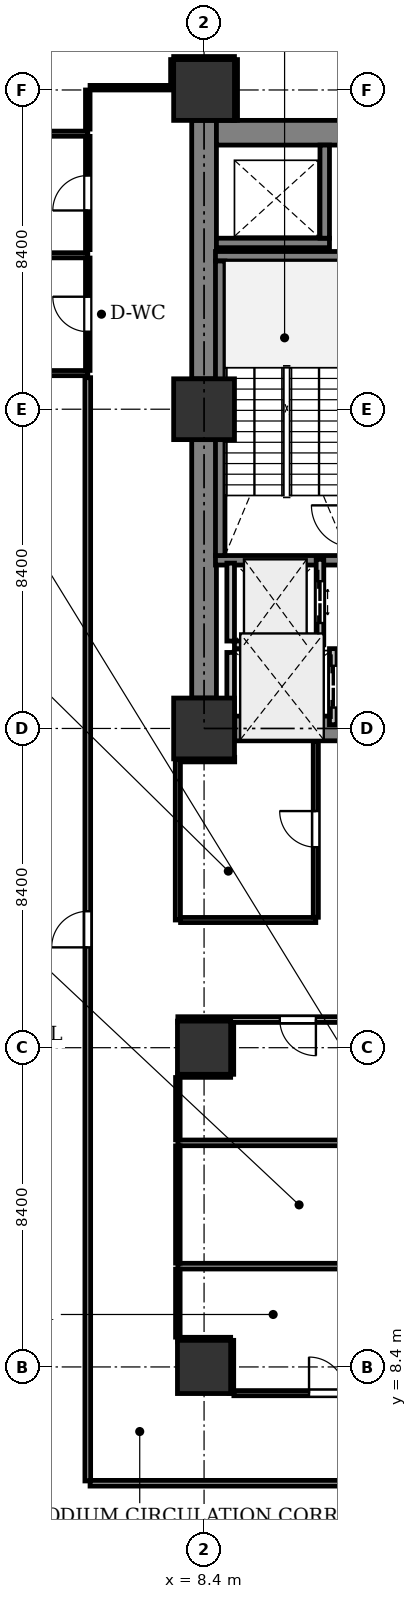
"""IFC4 building model, lengths in metres.
Left out: names, types, materials, properties, quantities, classifications, styles, units other than length and angle.
Written with IfcOpenShell. Run it as: python <this file> out.ifc"""

import sys

from ifc_helpers import new_model, si_unit, direction, frame, frame_2d, origin, origin_2d, place, context, subcontext, project, spatial, rectangle, extrude, element, fill, save


model = new_model("IFC4")
c1 = context("Model", 3, precision=1e-05, world=origin(), true_north=direction((0.0, 1.0)))
c2 = subcontext(c1, "Body", "Model", "MODEL_VIEW")
j1 = project(units=[si_unit("LENGTHUNIT", "METRE"), si_unit("PLANEANGLEUNIT", "RADIAN")], contexts=[c1])
p1 = place(None, origin())
s1 = spatial("IfcSite", under=j1, at=p1, CompositionType="ELEMENT")
p2 = place(p1, origin())
s2 = spatial("IfcBuilding", under=s1, at=p2, CompositionType="ELEMENT")
p3 = place(p2, frame((0.0, 0.0, 5.4)))
s3 = spatial("IfcBuildingStorey", under=s2, at=p3, CompositionType="ELEMENT", Elevation=5.4)
for number, where, z_axis, x_axis in (
    (1, (8.4, 8.4, 0.0), (0.0, 0.0, 1.0), (1.0, 0.0, 0.0)),
    (2, (8.4, 16.8, 0.0), (0.0, 0.0, 1.0), (1.0, 0.0, 0.0)),
):
    element("IfcColumn", number, at=place(p3, frame(where, z_axis=z_axis, x_axis=x_axis)), inside=s3, PredefinedType="COLUMN", context=c2, shape_type="SweptSolid", body=[
        extrude(rectangle(XDim=1.4, YDim=1.4, at=origin_2d()), origin(), (0.0, 0.0, 1.0), 4.8),
    ])
for number, where, z_axis, x_axis in (
    (3, (8.4, 25.2, 0.0), (0.0, 0.0, 1.0), (1.0, 0.0, 0.0)),
    (4, (8.4, 33.6, 0.0), (0.0, 0.0, 1.0), (1.0, 0.0, 0.0)),
    (5, (8.4, 42.0, 0.0), (0.0, 0.0, 1.0), (1.0, 0.0, 0.0)),
):
    element("IfcColumn", number, at=place(p3, frame(where, z_axis=z_axis, x_axis=x_axis)), inside=s3, PredefinedType="COLUMN", context=c2, shape_type="SweptSolid", body=[
        extrude(rectangle(XDim=1.6, YDim=1.6, at=origin_2d()), origin(), (0.0, 0.0, 1.0), 4.8),
    ])
for number, where, z_axis, x_axis in (
    (6, (8.4, 26.0, 0.0), (0.0, 0.0, 1.0), (0.0, 1.0, 0.0)),
    (7, (8.4, 34.4, 0.0), (0.0, 0.0, 1.0), (0.0, 1.0, 0.0)),
):
    element("IfcWall", number, at=place(p3, frame(where, z_axis=z_axis, x_axis=x_axis)), inside=s3, PredefinedType="SHEAR", context=c2, shape_type="SweptSolid", body=[
        extrude(rectangle(XDim=6.8, YDim=0.65, at=frame_2d((3.4, 0.0))), origin(), (0.0, 0.0, 1.0), 4.525),
    ])
p4 = place(p3, frame((8.725, 40.875, 0.0), z_axis=(0.0, 0.0, 1.0), x_axis=(1.0, 0.0, 0.0)))
e8 = element("IfcWall", 8, at=p4, inside=s3, PredefinedType="SHEAR", context=c2, shape_type="SweptSolid", body=[
    extrude(rectangle(XDim=7.75, YDim=0.65, at=frame_2d((3.875, 0.0))), origin(), (0.0, 0.0, 1.0), 4.525),
])
p5 = place(p3, frame((9.2, 25.2, 0.0), z_axis=(0.0, 0.0, 1.0), x_axis=(1.0, 0.0, 0.0)))
e9 = element("IfcWall", 9, at=p5, inside=s3, PredefinedType="SHEAR", context=c2, shape_type="SweptSolid", body=[
    extrude(rectangle(XDim=6.8, YDim=0.65, at=frame_2d((3.4, 0.0))), origin(), (0.0, 0.0, 1.0), 4.525),
])
p6 = place(p5, frame((3.5, 0.0, 0.0)))
e10 = element("IfcOpeningElement", 10, at=p6, cuts=e9, PredefinedType="OPENING", context=c2, shape_type="SweptSolid", body=[
    extrude(rectangle(XDim=1.1, YDim=2.15, at=frame_2d((0.55, 1.075))), frame((0.0, 0.335, 0.0), z_axis=(0.0, -1.0, 0.0), x_axis=(1.0, 0.0, 0.0)), (0.0, 0.0, 1.0), 0.67),
])
for number, where, z_axis, x_axis in (
    (11, (12.45, 29.625, 0.0), (0.0, 0.0, 1.0), (-1.0, 0.0, 0.0)),
    (12, (12.45, 37.625, 0.0), (0.0, 0.0, 1.0), (-1.0, 0.0, 0.0)),
):
    element("IfcWall", number, at=place(p3, frame(where, z_axis=z_axis, x_axis=x_axis)), inside=s3, PredefinedType="SHEAR", context=c2, shape_type="SweptSolid", body=[
        extrude(rectangle(XDim=3.75, YDim=0.25, at=frame_2d((1.875, 0.0))), origin(), (0.0, 0.0, 1.0), 4.525),
    ])
p7 = place(p3, frame((8.825, 29.75, 0.0), z_axis=(0.0, 0.0, 1.0), x_axis=(0.0, 1.0, 0.0)))
e13 = element("IfcWall", 13, at=p7, inside=s3, PredefinedType="SHEAR", context=c2, shape_type="SweptSolid", body=[
    extrude(rectangle(XDim=7.75, YDim=0.25, at=frame_2d((3.875, 0.0))), origin(), (0.0, 0.0, 1.0), 4.525),
])
p8 = place(p3, frame((8.725, 37.975, 0.0), z_axis=(0.0, 0.0, 1.0), x_axis=(1.0, 0.0, 0.0)))
e14 = element("IfcWall", 14, at=p8, inside=s3, PredefinedType="SHEAR", context=c2, shape_type="SweptSolid", body=[
    extrude(rectangle(XDim=2.975, YDim=0.25, at=frame_2d((1.487, 0.0))), origin(), (0.0, 0.0, 1.0), 4.525),
])
p9 = place(p3, frame((11.575, 38.1, 0.0), z_axis=(0.0, 0.0, 1.0), x_axis=(0.0, 1.0, 0.0)))
e15 = element("IfcWall", 15, at=p9, inside=s3, PredefinedType="SHEAR", context=c2, shape_type="SweptSolid", body=[
    extrude(rectangle(XDim=2.45, YDim=0.25, at=frame_2d((1.225, 0.0))), origin(), (0.0, 0.0, 1.0), 4.525),
])
p10 = place(p3, frame((11.45, 27.4, 0.0), z_axis=(0.0, 0.0, 1.0), x_axis=(0.0, 1.0, 0.0)))
e16 = element("IfcWall", 16, at=p10, inside=s3, PredefinedType="PARTITIONING", context=c2, shape_type="SweptSolid", body=[
    extrude(rectangle(XDim=2.25, YDim=0.2, at=frame_2d((1.125, 0.0))), origin(), (0.0, 0.0, 1.0), 4.525),
])
p11 = place(p10, frame((0.575, 0.0, 0.0)))
e17 = element("IfcOpeningElement", 17, at=p11, cuts=e16, PredefinedType="OPENING", context=c2, shape_type="SweptSolid", body=[
    extrude(rectangle(XDim=1.1, YDim=2.2, at=frame_2d((0.55, 1.1))), frame((0.0, 0.11, 0.0), z_axis=(0.0, -1.0, 0.0), x_axis=(1.0, 0.0, 0.0)), (0.0, 0.0, 1.0), 0.22),
])
p12 = place(p3, frame((9.1, 27.5, 0.0), z_axis=(0.0, 0.0, 1.0), x_axis=(0.0, 1.0, 0.0)))
e18 = element("IfcWall", 18, at=p12, inside=s3, PredefinedType="PARTITIONING", context=c2, shape_type="SweptSolid", body=[
    extrude(rectangle(XDim=2.05, YDim=0.2, at=frame_2d((1.025, 0.0))), origin(), (0.0, 0.0, 1.0), 4.525),
])
p13 = place(p3, frame((9.2, 27.4, 0.0), z_axis=(0.0, 0.0, 1.0), x_axis=(1.0, 0.0, 0.0)))
e19 = element("IfcWall", 19, at=p13, inside=s3, PredefinedType="PARTITIONING", context=c2, shape_type="SweptSolid", body=[
    extrude(rectangle(XDim=2.15, YDim=0.2, at=frame_2d((1.075, 0.0))), origin(), (0.0, 0.0, 1.0), 4.525),
])
p14 = place(p3, frame((11.8, 25.3, 0.0), z_axis=(0.0, 0.0, 1.0), x_axis=(0.0, 1.0, 0.0)))
e20 = element("IfcWall", 20, at=p14, inside=s3, PredefinedType="PARTITIONING", context=c2, shape_type="SweptSolid", body=[
    extrude(rectangle(XDim=2.0, YDim=0.2, at=frame_2d((1.0, 0.0))), origin(), (0.0, 0.0, 1.0), 4.525),
])
p15 = place(p14, frame((0.45, 0.0, 0.0)))
e21 = element("IfcOpeningElement", 21, at=p15, cuts=e20, PredefinedType="OPENING", context=c2, shape_type="SweptSolid", body=[
    extrude(rectangle(XDim=1.1, YDim=2.2, at=frame_2d((0.55, 1.1))), frame((0.0, 0.11, 0.0), z_axis=(0.0, -1.0, 0.0), x_axis=(1.0, 0.0, 0.0)), (0.0, 0.0, 1.0), 0.22),
])
p16 = place(p3, frame((9.1, 25.4, 0.0), z_axis=(0.0, 0.0, 1.0), x_axis=(0.0, 1.0, 0.0)))
e22 = element("IfcWall", 22, at=p16, inside=s3, PredefinedType="PARTITIONING", context=c2, shape_type="SweptSolid", body=[
    extrude(rectangle(XDim=1.8, YDim=0.2, at=frame_2d((0.9, 0.0))), origin(), (0.0, 0.0, 1.0), 4.525),
])
for number, where, z_axis, x_axis in (
    (23, (5.34, 37.65, 0.0), (0.0, 0.0, 1.0), (-1.0, 0.0, 0.0)),
    (24, (0.169, 34.55, 0.0), (0.0, 0.0, 1.0), (1.0, 0.0, 0.0)),
):
    element("IfcWall", number, at=place(p3, frame(where, z_axis=z_axis, x_axis=x_axis)), inside=s3, PredefinedType="PARTITIONING", context=c2, shape_type="SweptSolid", body=[
        extrude(rectangle(XDim=5.171, YDim=0.135, at=frame_2d((2.585, 0.0))), origin(), (0.0, 0.0, 1.0), 4.122),
    ])
p17 = place(p3, frame((5.34, 34.622, 0.0), z_axis=(0.0, 0.0, 1.0), x_axis=(0.0, 1.0, 0.0)))
e25 = element("IfcWall", 25, at=p17, inside=s3, PredefinedType="PARTITIONING", context=c2, shape_type="SweptSolid", body=[
    extrude(rectangle(XDim=2.957, YDim=0.12, at=frame_2d((1.479, 0.0))), origin(), (0.0, 0.0, 1.0), 4.525),
])
p18 = place(p17, frame((1.019, 0.0, 0.0)))
e26 = element("IfcOpeningElement", 26, at=p18, cuts=e25, PredefinedType="OPENING", context=c2, shape_type="SweptSolid", body=[
    extrude(rectangle(XDim=0.92, YDim=2.1, at=frame_2d((0.46, 1.05))), frame((0.0, 0.07, 0.0), z_axis=(0.0, -1.0, 0.0), x_axis=(1.0, 0.0, 0.0)), (0.0, 0.0, 1.0), 0.14),
])
p19 = place(p3, frame((5.34, 40.85, 0.0), z_axis=(0.0, 0.0, 1.0), x_axis=(-1.0, 0.0, 0.0)))
e27 = element("IfcWall", 27, at=p19, inside=s3, PredefinedType="PARTITIONING", context=c2, shape_type="SweptSolid", body=[
    extrude(rectangle(XDim=5.171, YDim=0.135, at=frame_2d((2.585, 0.0))), origin(), (0.0, 0.0, 1.0), 4.122),
])
p20 = place(p3, frame((5.34, 37.8, 0.0), z_axis=(0.0, 0.0, 1.0), x_axis=(0.0, 1.0, 0.0)))
e28 = element("IfcWall", 28, at=p20, inside=s3, PredefinedType="PARTITIONING", context=c2, shape_type="SweptSolid", body=[
    extrude(rectangle(XDim=2.979, YDim=0.12, at=frame_2d((1.489, 0.0))), origin(), (0.0, 0.0, 1.0), 4.525),
])
p21 = place(p20, frame((1.029, 0.0, 0.0)))
e29 = element("IfcOpeningElement", 29, at=p21, cuts=e28, PredefinedType="OPENING", context=c2, shape_type="SweptSolid", body=[
    extrude(rectangle(XDim=0.92, YDim=2.1, at=frame_2d((0.46, 1.05))), frame((0.0, 0.07, 0.0), z_axis=(0.0, -1.0, 0.0), x_axis=(1.0, 0.0, 0.0)), (0.0, 0.0, 1.0), 0.14),
])
p22 = place(p3, frame((7.71, 14.296, 0.0), z_axis=(0.0, 0.0, 1.0), x_axis=(1.0, 0.0, 0.0)))
e30 = element("IfcWall", 30, at=p22, inside=s3, PredefinedType="PARTITIONING", context=c2, shape_type="SweptSolid", body=[
    extrude(rectangle(XDim=6.38, YDim=0.15, at=frame_2d((3.19, 0.0))), origin(), (0.0, 0.0, 1.0), 3.913),
])
p23 = place(p3, frame((14.026, 17.54, 0.0), z_axis=(0.0, 0.0, 1.0), x_axis=(-1.0, 0.0, 0.0)))
e31 = element("IfcWall", 31, at=p23, inside=s3, PredefinedType="PARTITIONING", context=c2, shape_type="SweptSolid", body=[
    extrude(rectangle(XDim=6.316, YDim=0.15, at=frame_2d((3.158, 0.0))), origin(), (0.0, 0.0, 1.0), 3.913),
])
p24 = place(p23, frame((2.683, 0.0, 0.0)))
e32 = element("IfcOpeningElement", 32, at=p24, cuts=e31, PredefinedType="OPENING", context=c2, shape_type="SweptSolid", body=[
    extrude(rectangle(XDim=0.95, YDim=2.15, at=frame_2d((0.475, 1.075))), frame((0.0, 0.085, 0.0), z_axis=(0.0, -1.0, 0.0), x_axis=(1.0, 0.0, 0.0)), (0.0, 0.0, 1.0), 0.17),
])
p25 = place(p3, frame((9.12, 17.461, 0.0), z_axis=(0.0, 0.0, 1.0), x_axis=(0.0, -1.0, 0.0)))
e33 = element("IfcWall", 33, at=p25, inside=s3, PredefinedType="PARTITIONING", context=c2, shape_type="SweptSolid", body=[
    extrude(rectangle(XDim=1.361, YDim=0.12, at=frame_2d((0.68, 0.0))), origin(), (0.0, 0.0, 1.0), 3.725),
])
p26 = place(p3, frame((9.1, 16.08, 0.0), z_axis=(0.0, 0.0, 1.0), x_axis=(-1.0, 0.0, 0.0)))
e34 = element("IfcWall", 34, at=p26, inside=s3, PredefinedType="PARTITIONING", context=c2, shape_type="SweptSolid", body=[
    extrude(rectangle(XDim=1.39, YDim=0.12, at=frame_2d((0.695, 0.0))), origin(), (0.0, 0.0, 1.0), 3.913),
])
p27 = place(p3, frame((7.71, 16.016, 0.0), z_axis=(0.0, 0.0, 1.0), x_axis=(0.0, -1.0, 0.0)))
e35 = element("IfcWall", 35, at=p27, inside=s3, PredefinedType="PARTITIONING", context=c2, shape_type="SweptSolid", body=[
    extrude(rectangle(XDim=1.641, YDim=0.12, at=frame_2d((0.821, 0.0))), origin(), (0.0, 0.0, 1.0), 4.525),
])
p28 = place(p3, frame((7.71, 11.052, 0.0), z_axis=(0.0, 0.0, 1.0), x_axis=(1.0, 0.0, 0.0)))
e36 = element("IfcWall", 36, at=p28, inside=s3, PredefinedType="PARTITIONING", context=c2, shape_type="SweptSolid", body=[
    extrude(rectangle(XDim=6.38, YDim=0.15, at=frame_2d((3.19, 0.0))), origin(), (0.0, 0.0, 1.0), 3.913),
])
p29 = place(p3, frame((7.71, 14.217, 0.0), z_axis=(0.0, 0.0, 1.0), x_axis=(0.0, -1.0, 0.0)))
e37 = element("IfcWall", 37, at=p29, inside=s3, PredefinedType="PARTITIONING", context=c2, shape_type="SweptSolid", body=[
    extrude(rectangle(XDim=3.086, YDim=0.12, at=frame_2d((1.543, 0.0))), origin(), (0.0, 0.0, 1.0), 4.525),
])
p30 = place(p3, frame((7.71, 9.12, 0.0), z_axis=(0.0, 0.0, 1.0), x_axis=(1.0, 0.0, 0.0)))
e38 = element("IfcWall", 38, at=p30, inside=s3, PredefinedType="PARTITIONING", context=c2, shape_type="SweptSolid", body=[
    extrude(rectangle(XDim=1.39, YDim=0.12, at=frame_2d((0.695, 0.0))), origin(), (0.0, 0.0, 1.0), 3.913),
])
p31 = place(p3, frame((9.12, 9.1, 0.0), z_axis=(0.0, 0.0, 1.0), x_axis=(0.0, -1.0, 0.0)))
e39 = element("IfcWall", 39, at=p31, inside=s3, PredefinedType="PARTITIONING", context=c2, shape_type="SweptSolid", body=[
    extrude(rectangle(XDim=1.39, YDim=0.12, at=frame_2d((0.695, 0.0))), origin(), (0.0, 0.0, 1.0), 3.725),
])
p32 = place(p3, frame((9.184, 7.71, 0.0), z_axis=(0.0, 0.0, 1.0), x_axis=(1.0, 0.0, 0.0)))
e40 = element("IfcWall", 40, at=p32, inside=s3, PredefinedType="PARTITIONING", context=c2, shape_type="SweptSolid", body=[
    extrude(rectangle(XDim=4.906, YDim=0.135, at=frame_2d((2.453, 0.0))), origin(), (0.0, 0.0, 1.0), 4.122),
])
p33 = place(p32, frame((1.978, 0.0, 0.0)))
e41 = element("IfcOpeningElement", 41, at=p33, cuts=e40, PredefinedType="OPENING", context=c2, shape_type="SweptSolid", body=[
    extrude(rectangle(XDim=0.95, YDim=2.15, at=frame_2d((0.475, 1.075))), frame((0.0, 0.077, 0.0), z_axis=(0.0, -1.0, 0.0), x_axis=(1.0, 0.0, 0.0)), (0.0, 0.0, 1.0), 0.155),
])
p34 = place(p3, frame((7.71, 10.973, 0.0), z_axis=(0.0, 0.0, 1.0), x_axis=(0.0, -1.0, 0.0)))
e42 = element("IfcWall", 42, at=p34, inside=s3, PredefinedType="PARTITIONING", context=c2, shape_type="SweptSolid", body=[
    extrude(rectangle(XDim=1.789, YDim=0.12, at=frame_2d((0.895, 0.0))), origin(), (0.0, 0.0, 1.0), 4.525),
])
p35 = place(p3, frame((5.34, 40.97, 0.0), z_axis=(0.0, 0.0, 1.0), x_axis=(0.0, 1.0, 0.0)))
e43 = element("IfcWall", 43, at=p35, inside=s3, PredefinedType="PARTITIONING", context=c2, shape_type="SweptSolid", body=[
    extrude(rectangle(XDim=1.03, YDim=0.12, at=frame_2d((0.515, 0.0))), origin(), (0.0, 0.0, 1.0), 3.725),
])
p36 = place(p3, frame((5.4, 42.06, 0.0), z_axis=(0.0, 0.0, 1.0), x_axis=(1.0, 0.0, 0.0)))
e44 = element("IfcWall", 44, at=p36, inside=s3, PredefinedType="PARTITIONING", context=c2, shape_type="SweptSolid", body=[
    extrude(rectangle(XDim=2.18, YDim=0.12, at=frame_2d((1.09, 0.0))), origin(), (0.0, 0.0, 1.0), 3.725),
])
p37 = place(p3, frame((7.58, 42.124, 0.0), z_axis=(0.0, 0.0, 1.0), x_axis=(0.0, 1.0, 0.0)))
e45 = element("IfcWall", 45, at=p37, inside=s3, PredefinedType="PARTITIONING", context=c2, shape_type="SweptSolid", body=[
    extrude(rectangle(XDim=0.676, YDim=0.12, at=frame_2d((0.338, 0.0))), origin(), (0.0, 0.0, 1.0), 4.525),
])
p38 = place(p3, frame((7.6, 42.82, 0.0), z_axis=(0.0, 0.0, 1.0), x_axis=(1.0, 0.0, 0.0)))
e46 = element("IfcWall", 46, at=p38, inside=s3, PredefinedType="PARTITIONING", context=c2, shape_type="SweptSolid", body=[
    extrude(rectangle(XDim=1.6, YDim=0.12, at=frame_2d((0.8, 0.0))), origin(), (0.0, 0.0, 1.0), 3.913),
])
p39 = place(p3, frame((9.22, 42.8, 0.0), z_axis=(0.0, 0.0, 1.0), x_axis=(0.0, -1.0, 0.0)))
e47 = element("IfcWall", 47, at=p39, inside=s3, PredefinedType="PARTITIONING", context=c2, shape_type="SweptSolid", body=[
    extrude(rectangle(XDim=1.596, YDim=0.12, at=frame_2d((0.798, 0.0))), origin(), (0.0, 0.0, 1.0), 3.725),
])
p40 = place(p3, frame((9.206, 24.381, 0.0), z_axis=(0.0, 0.0, 1.0), x_axis=(-0.999999786895, -0.00065284791, 0.0)))
e48 = element("IfcWall", 48, at=p40, inside=s3, PredefinedType="PARTITIONING", context=c2, shape_type="SweptSolid", body=[
    extrude(rectangle(XDim=1.496, YDim=0.12, at=frame_2d((0.748, 0.0))), origin(), (0.0, 0.0, 1.0), 3.913),
])
p41 = place(p3, frame((7.71, 24.38, 0.0), z_axis=(0.0, 0.0, 1.0), x_axis=(0.0, -1.0, 0.0)))
e49 = element("IfcWall", 49, at=p41, inside=s3, PredefinedType="PARTITIONING", context=c2, shape_type="SweptSolid", body=[
    extrude(rectangle(XDim=4.22, YDim=0.135, at=frame_2d((2.11, 0.0))), origin(), (0.0, 0.0, 1.0), 4.525),
])
p42 = place(p3, frame((7.781, 20.16, 0.0), z_axis=(0.0, 0.0, 1.0), x_axis=(1.0, 0.0, 0.0)))
e50 = element("IfcWall", 50, at=p42, inside=s3, PredefinedType="PARTITIONING", context=c2, shape_type="SweptSolid", body=[
    extrude(rectangle(XDim=3.559, YDim=0.135, at=frame_2d((1.779, 0.0))), origin(), (0.0, 0.0, 1.0), 3.913),
])
p43 = place(p3, frame((11.34, 20.231, 0.0), z_axis=(0.0, 0.0, 1.0), x_axis=(0.0, 1.0, 0.0)))
e51 = element("IfcWall", 51, at=p43, inside=s3, PredefinedType="PARTITIONING", context=c2, shape_type="SweptSolid", body=[
    extrude(rectangle(XDim=4.64, YDim=0.135, at=frame_2d((2.32, 0.0))), origin(), (0.0, 0.0, 1.0), 4.525),
])
p44 = place(p43, frame((1.845, 0.0, 0.0)))
e52 = element("IfcOpeningElement", 52, at=p44, cuts=e51, PredefinedType="OPENING", context=c2, shape_type="SweptSolid", body=[
    extrude(rectangle(XDim=0.95, YDim=2.15, at=frame_2d((0.475, 1.075))), frame((0.0, 0.077, 0.0), z_axis=(0.0, -1.0, 0.0), x_axis=(1.0, 0.0, 0.0)), (0.0, 0.0, 1.0), 0.155),
])
p45 = place(p3, frame((5.34, 5.4, 0.0), z_axis=(0.0, 0.0, 1.0), x_axis=(0.0, 1.0, 0.0)))
e53 = element("IfcWall", 53, at=p45, inside=s3, PredefinedType="PARTITIONING", context=c2, shape_type="SweptSolid", body=[
    extrude(rectangle(XDim=29.03, YDim=0.15, at=frame_2d((14.515, 0.0))), origin(), (0.0, 0.0, 1.0), 3.725),
])
p46 = place(p45, frame((14.04, 0.0, 0.0)))
e54 = element("IfcOpeningElement", 54, at=p46, cuts=e53, PredefinedType="OPENING", context=c2, shape_type="SweptSolid", body=[
    extrude(rectangle(XDim=0.95, YDim=2.15, at=frame_2d((0.475, 1.075))), frame((0.0, 0.085, 0.0), z_axis=(0.0, -1.0, 0.0), x_axis=(1.0, 0.0, 0.0)), (0.0, 0.0, 1.0), 0.17),
])
p47 = place(p3, frame((16.8, 5.34, 0.0), z_axis=(0.0, 0.0, 1.0), x_axis=(-1.0, 0.0, 0.0)))
e55 = element("IfcWall", 55, at=p47, inside=s3, PredefinedType="PARTITIONING", context=c2, shape_type="SweptSolid", body=[
    extrude(rectangle(XDim=11.4, YDim=0.15, at=frame_2d((5.7, 0.0))), origin(), (0.0, 0.0, 1.0), 3.913),
])
p48 = place(p11, origin())
e56 = element("IfcDoor", 56, at=p48, inside=s3, OperationType="DOUBLE_DOOR_SLIDING", PredefinedType="DOOR", context=c2, shape_type="SweptSolid", body=[
    extrude(rectangle(XDim=1.1, YDim=2.2, at=frame_2d((0.55, 1.1))), frame((0.0, 0.025, 0.0), z_axis=(0.0, -1.0, 0.0), x_axis=(1.0, 0.0, 0.0)), (0.0, 0.0, 1.0), 0.05),
])
fill(e17, e56)
p49 = place(p15, origin())
e57 = element("IfcDoor", 57, at=p49, inside=s3, OperationType="DOUBLE_DOOR_SLIDING", PredefinedType="DOOR", context=c2, shape_type="SweptSolid", body=[
    extrude(rectangle(XDim=1.1, YDim=2.2, at=frame_2d((0.55, 1.1))), frame((0.0, 0.025, 0.0), z_axis=(0.0, -1.0, 0.0), x_axis=(1.0, 0.0, 0.0)), (0.0, 0.0, 1.0), 0.05),
])
fill(e21, e57)
p50 = place(p18, origin())
e58 = element("IfcDoor", 58, at=p50, inside=s3, OperationType="SINGLE_SWING_RIGHT", PredefinedType="DOOR", context=c2, shape_type="SweptSolid", body=[
    extrude(rectangle(XDim=0.92, YDim=2.1, at=frame_2d((0.46, 1.05))), frame((0.0, 0.025, 0.0), z_axis=(0.0, -1.0, 0.0), x_axis=(1.0, 0.0, 0.0)), (0.0, 0.0, 1.0), 0.05),
])
fill(e26, e58)
p51 = place(p21, origin())
e59 = element("IfcDoor", 59, at=p51, inside=s3, OperationType="SINGLE_SWING_LEFT", PredefinedType="DOOR", context=c2, shape_type="SweptSolid", body=[
    extrude(rectangle(XDim=0.92, YDim=2.1, at=frame_2d((0.46, 1.05))), frame((0.0, 0.025, 0.0), z_axis=(0.0, -1.0, 0.0), x_axis=(1.0, 0.0, 0.0)), (0.0, 0.0, 1.0), 0.05),
])
fill(e29, e59)
p52 = place(p24, origin())
e60 = element("IfcDoor", 60, at=p52, inside=s3, OperationType="SINGLE_SWING_LEFT", PredefinedType="DOOR", context=c2, shape_type="SweptSolid", body=[
    extrude(rectangle(XDim=0.95, YDim=2.15, at=frame_2d((0.475, 1.075))), frame((0.0, 0.025, 0.0), z_axis=(0.0, -1.0, 0.0), x_axis=(1.0, 0.0, 0.0)), (0.0, 0.0, 1.0), 0.05),
])
fill(e32, e60)
p53 = place(p33, origin())
e61 = element("IfcDoor", 61, at=p53, inside=s3, OperationType="SINGLE_SWING_LEFT", PredefinedType="DOOR", context=c2, shape_type="SweptSolid", body=[
    extrude(rectangle(XDim=0.95, YDim=2.15, at=frame_2d((0.475, 1.075))), frame((0.0, 0.025, 0.0), z_axis=(0.0, -1.0, 0.0), x_axis=(1.0, 0.0, 0.0)), (0.0, 0.0, 1.0), 0.05),
])
fill(e41, e61)
p54 = place(p44, origin())
e62 = element("IfcDoor", 62, at=p54, inside=s3, OperationType="SINGLE_SWING_RIGHT", PredefinedType="DOOR", context=c2, shape_type="SweptSolid", body=[
    extrude(rectangle(XDim=0.95, YDim=2.15, at=frame_2d((0.475, 1.075))), frame((0.0, 0.025, 0.0), z_axis=(0.0, -1.0, 0.0), x_axis=(1.0, 0.0, 0.0)), (0.0, 0.0, 1.0), 0.05),
])
fill(e52, e62)
p55 = place(p46, origin())
e63 = element("IfcDoor", 63, at=p55, inside=s3, OperationType="SINGLE_SWING_LEFT", PredefinedType="DOOR", context=c2, shape_type="SweptSolid", body=[
    extrude(rectangle(XDim=0.95, YDim=2.15, at=frame_2d((0.475, 1.075))), frame((0.0, 0.025, 0.0), z_axis=(0.0, -1.0, 0.0), x_axis=(1.0, 0.0, 0.0)), (0.0, 0.0, 1.0), 0.05),
])
fill(e54, e63)
save(model, sys.argv[1])
